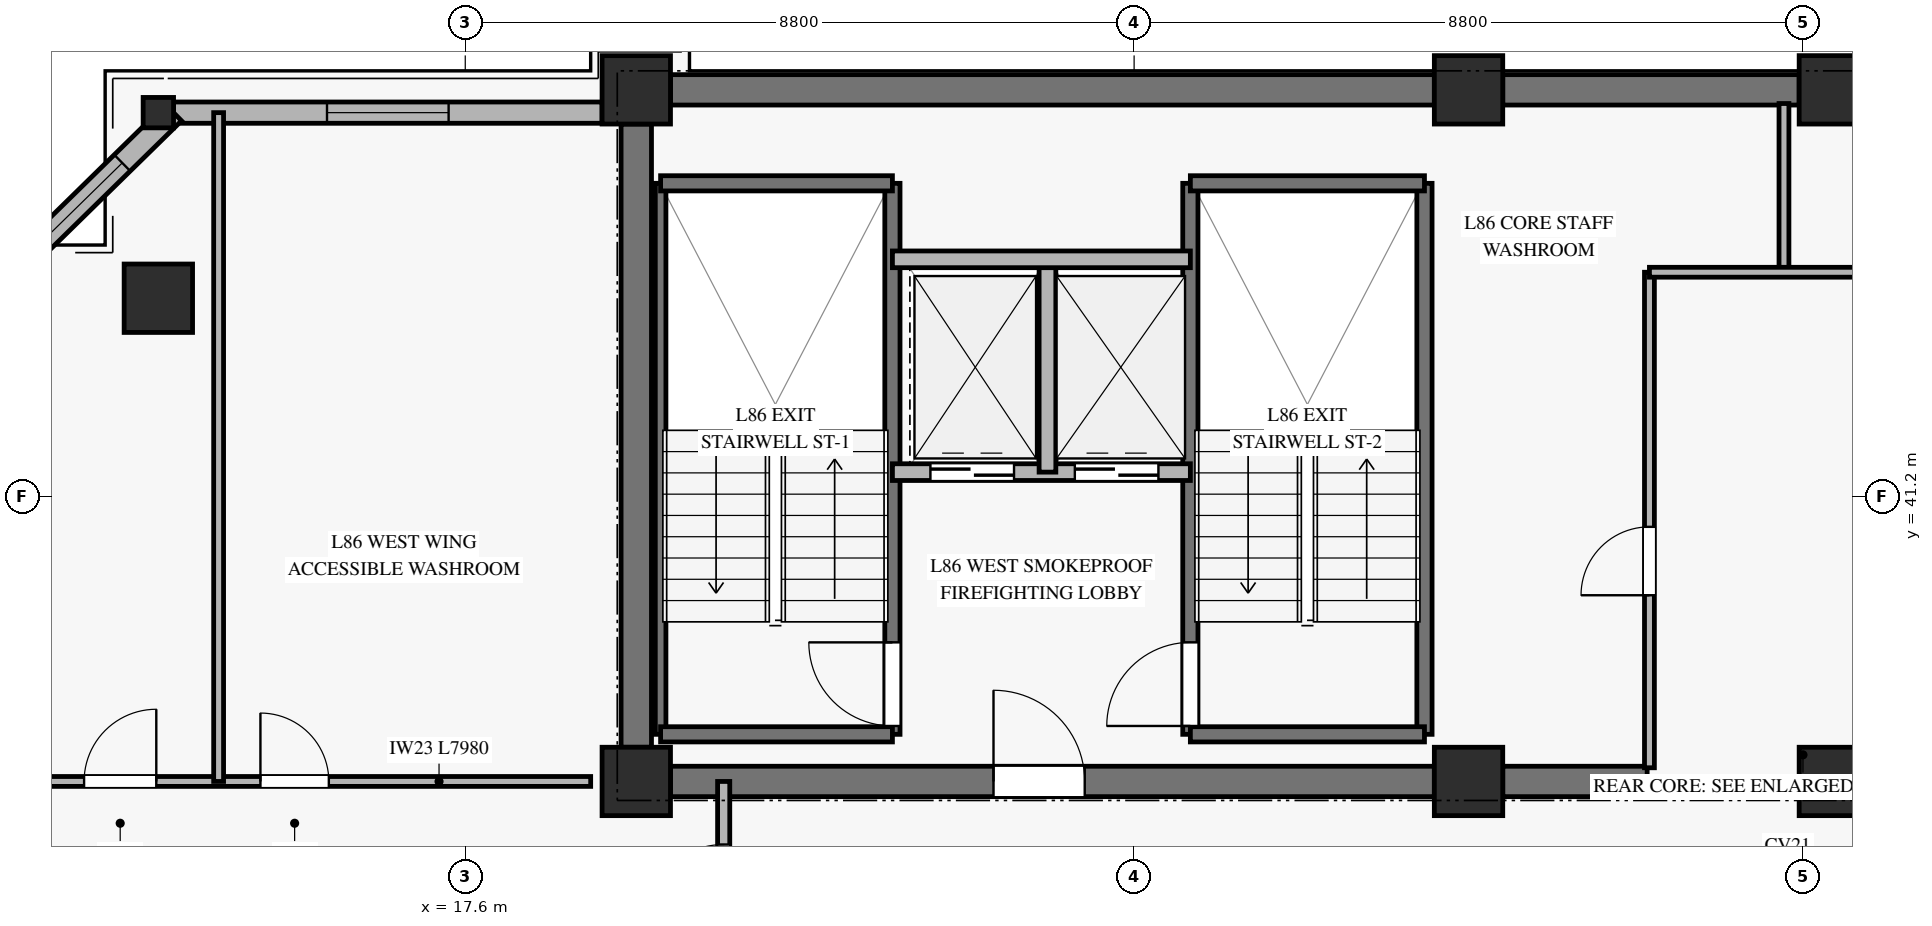
"""IFC4 building model, lengths in metres.
Left out: names, types, materials, properties, quantities, classifications, styles, units other than length and angle.
Written with IfcOpenShell. Run it as: python <this file> out.ifc"""

import sys

from ifc_helpers import new_model, si_unit, direction, frame, frame_2d, origin, origin_2d, place, context, subcontext, project, spatial, rectangle, hollow_rectangle, extrude, source, transform, mapped, element, fill, save


model = new_model("IFC4")
c1 = context("Model", 3, precision=1e-05, world=origin(), true_north=direction((0.0, 1.0)))
c2 = subcontext(c1, "Body", "Model", "MODEL_VIEW")
j1 = project(units=[si_unit("LENGTHUNIT", "METRE"), si_unit("PLANEANGLEUNIT", "RADIAN")], contexts=[c1])
p1 = place(None, origin())
s1 = spatial("IfcSite", under=j1, at=p1, CompositionType="ELEMENT")
p2 = place(p1, origin())
s2 = spatial("IfcBuilding", under=s1, at=p2, CompositionType="ELEMENT")
p3 = place(p2, frame((0.0, 0.0, 332.3)))
s3 = spatial("IfcBuildingStorey", under=s2, at=p3, CompositionType="ELEMENT", Elevation=332.3)
m1 = source(origin(), c2, "Body", "SweptSolid", [
    extrude(rectangle(XDim=0.9, YDim=0.9, at=origin_2d()), origin(), (0.0, 0.0, 1.0), 3.185),
])
for number, where, z_axis, x_axis in (
    (1, (19.85, 37.45, 0.0), (0.0, 0.0, 1.0), (1.0, 0.0, 0.0)),
    (2, (19.85, 46.55, 0.0), (0.0, 0.0, 1.0), (1.0, 0.0, 0.0)),
    (3, (30.8, 37.45, 0.0), (0.0, 0.0, 1.0), (1.0, 0.0, 0.0)),
    (4, (30.8, 46.55, 0.0), (0.0, 0.0, 1.0), (1.0, 0.0, 0.0)),
    (5, (35.6, 37.45, 0.0), (0.0, 0.0, 1.0), (1.0, 0.0, 0.0)),
    (6, (35.6, 46.55, 0.0), (0.0, 0.0, 1.0), (1.0, 0.0, 0.0)),
):
    element("IfcColumn", number, at=place(p3, frame(where, z_axis=z_axis, x_axis=x_axis)), inside=s3, PredefinedType="PILASTER", context=c2, shape_type="MappedRepresentation", body=[
        mapped(m1, transform((0.0, 0.0, 0.0), x_axis=(1.0, 0.0, 0.0), y_axis=(0.0, 1.0, 0.0), z_axis=(0.0, 0.0, 1.0), scale=1.0)),
    ])
p4 = place(p3, frame((20.3, 46.55, 0.0), z_axis=(0.0, 0.0, 1.0), x_axis=(1.0, 0.0, 0.0)))
e7 = element("IfcWall", 7, at=p4, inside=s3, PredefinedType="SHEAR", context=c2, shape_type="SweptSolid", body=[
    extrude(rectangle(XDim=10.05, YDim=0.4, at=frame_2d((5.025, 0.0))), origin(), (0.0, 0.0, 1.0), 3.185),
])
p5 = place(p3, frame((31.25, 46.55, 0.0), z_axis=(0.0, 0.0, 1.0), x_axis=(1.0, 0.0, 0.0)))
e8 = element("IfcWall", 8, at=p5, inside=s3, PredefinedType="SHEAR", context=c2, shape_type="SweptSolid", body=[
    extrude(rectangle(XDim=3.9, YDim=0.4, at=frame_2d((1.95, 0.0))), origin(), (0.0, 0.0, 1.0), 3.185),
])
p6 = place(p3, frame((20.3, 37.45, 0.0), z_axis=(0.0, 0.0, 1.0), x_axis=(1.0, 0.0, 0.0)))
e9 = element("IfcWall", 9, at=p6, inside=s3, PredefinedType="SHEAR", context=c2, shape_type="SweptSolid", body=[
    extrude(rectangle(XDim=10.05, YDim=0.4, at=frame_2d((5.025, 0.0))), origin(), (0.0, 0.0, 1.0), 3.185),
])
p7 = place(p6, frame((4.25, 0.0, 0.0)))
e10 = element("IfcOpeningElement", 10, at=p7, cuts=e9, PredefinedType="OPENING", context=c2, shape_type="SweptSolid", body=[
    extrude(rectangle(XDim=1.2, YDim=2.15, at=frame_2d((0.6, 1.075))), frame((0.0, 0.21, 0.0), z_axis=(0.0, -1.0, 0.0), x_axis=(1.0, 0.0, 0.0)), (0.0, 0.0, 1.0), 0.42),
])
p8 = place(p3, frame((31.25, 37.45, 0.0), z_axis=(0.0, 0.0, 1.0), x_axis=(1.0, 0.0, 0.0)))
e11 = element("IfcWall", 11, at=p8, inside=s3, PredefinedType="SHEAR", context=c2, shape_type="SweptSolid", body=[
    extrude(rectangle(XDim=1.9, YDim=0.4, at=frame_2d((0.95, 0.0))), origin(), (0.0, 0.0, 1.0), 3.185),
])
p9 = place(p3, frame((19.85, 37.9, 0.0), z_axis=(0.0, 0.0, 1.0), x_axis=(0.0, 1.0, 0.0)))
e12 = element("IfcWall", 12, at=p9, inside=s3, PredefinedType="SHEAR", context=c2, shape_type="SweptSolid", body=[
    extrude(rectangle(XDim=8.2, YDim=0.4, at=frame_2d((4.1, 0.0))), origin(), (0.0, 0.0, 1.0), 3.185),
])
m2 = source(origin(), c2, "Body", "SweptSolid", [
    extrude(hollow_rectangle(XDim=0.9, YDim=0.9, WallThickness=0.04, at=origin_2d()), origin(), (0.0, 0.0, 1.0), 3.207),
])
p10 = place(p3, frame((13.562, 43.808, 0.0), z_axis=(0.115040045039, 0.01431338747, 0.993257728375), x_axis=(-0.1234688995, 0.99234844226, 0.0)))
e13 = element("IfcColumn", 13, at=p10, inside=s3, PredefinedType="COLUMN", context=c2, shape_type="MappedRepresentation", body=[
    mapped(m2, transform((0.0, 0.0, 0.0), x_axis=(1.0, 0.0, 0.0), y_axis=(0.0, 1.0, 0.0), z_axis=(0.0, 0.0, 1.0), scale=1.0)),
])
m3 = source(origin(), c2, "Body", "SweptSolid", [
    extrude(hollow_rectangle(XDim=0.4, YDim=0.4, WallThickness=0.02, at=origin_2d()), origin(), (0.0, 0.0, 1.0), 3.206),
])
p11 = place(p3, frame((13.562, 46.25, 0.0), z_axis=(0.115051831153, 0.0, 0.993359489887), x_axis=(0.0, 1.0, 0.0)))
e14 = element("IfcColumn", 14, at=p11, inside=s3, PredefinedType="COLUMN", context=c2, shape_type="MappedRepresentation", body=[
    mapped(m3, transform((0.0, 0.0, 0.0), x_axis=(1.0, 0.0, 0.0), y_axis=(0.0, 1.0, 0.0), z_axis=(0.0, 0.0, 1.0), scale=1.0)),
])
p12 = place(p3, frame((13.762, 46.25, 0.0), z_axis=(0.0, 0.0, 1.0), x_axis=(1.0, 0.0, 0.0)))
e15 = element("IfcWall", 15, at=p12, inside=s3, PredefinedType="SOLIDWALL", context=c2, shape_type="SweptSolid", body=[
    extrude(rectangle(XDim=5.638, YDim=0.28, at=frame_2d((2.819, 0.0))), origin(), (0.0, 0.0, 1.0), 2.815),
])
p13 = place(p12, frame((2.019, 0.0, 0.45)))
e16 = element("IfcOpeningElement", 16, at=p13, cuts=e15, PredefinedType="OPENING", context=c2, shape_type="SweptSolid", body=[
    extrude(rectangle(XDim=1.6, YDim=2.0, at=frame_2d((0.8, 1.0))), frame((0.0, 0.15, 0.0), z_axis=(0.0, -1.0, 0.0), x_axis=(1.0, 0.0, 0.0)), (0.0, 0.0, 1.0), 0.3),
])
p14 = place(p3, frame((13.762, 46.25, 0.0), z_axis=(0.0, 0.0, 1.0), x_axis=(-0.714242921934, -0.699897884314, 0.0)))
e17 = element("IfcWall", 17, at=p14, inside=s3, PredefinedType="SOLIDWALL", context=c2, shape_type="SweptSolid", body=[
    extrude(rectangle(XDim=3.489, YDim=0.3, at=frame_2d((1.745, 0.0))), origin(), (0.0, 0.0, 1.0), 2.815),
])
p15 = place(p14, frame((0.945, 0.0, 0.45)))
e18 = element("IfcOpeningElement", 18, at=p15, cuts=e17, PredefinedType="OPENING", context=c2, shape_type="SweptSolid", body=[
    extrude(rectangle(XDim=1.6, YDim=2.0, at=frame_2d((0.8, 1.0))), frame((0.0, 0.16, 0.0), z_axis=(0.0, -1.0, 0.0), x_axis=(1.0, 0.0, 0.0)), (0.0, 0.0, 1.0), 0.32),
])
p16 = place(p3, frame((20.17, 38.07, 0.0), z_axis=(0.0, 0.0, 1.0), x_axis=(0.0, 1.0, 0.0)))
e19 = element("IfcWall", 19, at=p16, inside=s3, PredefinedType="SOLIDWALL", context=c2, shape_type="SweptSolid", body=[
    extrude(rectangle(XDim=7.25, YDim=0.14, at=frame_2d((3.625, 0.0))), origin(), (0.0, 0.0, 1.0), 3.4),
])
p17 = place(p3, frame((23.22, 38.07, 0.0), z_axis=(0.0, 0.0, 1.0), x_axis=(0.0, 1.0, 0.0)))
e20 = element("IfcWall", 20, at=p17, inside=s3, PredefinedType="SOLIDWALL", context=c2, shape_type="SweptSolid", body=[
    extrude(rectangle(XDim=7.25, YDim=0.2, at=frame_2d((3.625, 0.0))), origin(), (0.0, 0.0, 1.0), 3.4),
])
p18 = place(p17, frame((0.11, 0.0, 0.0)))
e21 = element("IfcOpeningElement", 21, at=p18, cuts=e20, PredefinedType="OPENING", context=c2, shape_type="SweptSolid", body=[
    extrude(rectangle(XDim=1.1, YDim=2.15, at=frame_2d((0.55, 1.075))), frame((0.0, 0.11, 0.0), z_axis=(0.0, -1.0, 0.0), x_axis=(1.0, 0.0, 0.0)), (0.0, 0.0, 1.0), 0.22),
])
for number, where, z_axis, x_axis in (
    (22, (20.17, 45.32, 0.0), (0.0, 0.0, 1.0), (1.0, 0.0, 0.0)),
    (23, (20.17, 38.07, 0.0), (0.0, 0.0, 1.0), (1.0, 0.0, 0.0)),
):
    element("IfcWall", number, at=place(p3, frame(where, z_axis=z_axis, x_axis=x_axis)), inside=s3, PredefinedType="SOLIDWALL", context=c2, shape_type="SweptSolid", body=[
        extrude(rectangle(XDim=3.05, YDim=0.2, at=frame_2d((1.525, 0.0))), origin(), (0.0, 0.0, 1.0), 3.4),
    ])
p19 = place(p3, frame((27.14, 38.07, 0.0), z_axis=(0.0, 0.0, 1.0), x_axis=(0.0, 1.0, 0.0)))
e24 = element("IfcWall", 24, at=p19, inside=s3, PredefinedType="SOLIDWALL", context=c2, shape_type="SweptSolid", body=[
    extrude(rectangle(XDim=7.25, YDim=0.2, at=frame_2d((3.625, 0.0))), origin(), (0.0, 0.0, 1.0), 3.4),
])
p20 = place(p19, frame((0.11, 0.0, 0.0)))
e25 = element("IfcOpeningElement", 25, at=p20, cuts=e24, PredefinedType="OPENING", context=c2, shape_type="SweptSolid", body=[
    extrude(rectangle(XDim=1.1, YDim=2.15, at=frame_2d((0.55, 1.075))), frame((0.0, 0.11, 0.0), z_axis=(0.0, -1.0, 0.0), x_axis=(1.0, 0.0, 0.0)), (0.0, 0.0, 1.0), 0.22),
])
p21 = place(p3, frame((30.22, 38.07, 0.0), z_axis=(0.0, 0.0, 1.0), x_axis=(0.0, 1.0, 0.0)))
e26 = element("IfcWall", 26, at=p21, inside=s3, PredefinedType="SOLIDWALL", context=c2, shape_type="SweptSolid", body=[
    extrude(rectangle(XDim=7.25, YDim=0.2, at=frame_2d((3.625, 0.0))), origin(), (0.0, 0.0, 1.0), 3.4),
])
for number, where, z_axis, x_axis in (
    (27, (27.14, 45.32, 0.0), (0.0, 0.0, 1.0), (1.0, 0.0, 0.0)),
    (28, (27.14, 38.07, 0.0), (0.0, 0.0, 1.0), (1.0, 0.0, 0.0)),
):
    element("IfcWall", number, at=place(p3, frame(where, z_axis=z_axis, x_axis=x_axis)), inside=s3, PredefinedType="SOLIDWALL", context=c2, shape_type="SweptSolid", body=[
        extrude(rectangle(XDim=3.08, YDim=0.2, at=frame_2d((1.54, 0.0))), origin(), (0.0, 0.0, 1.0), 3.4),
    ])
p22 = place(p3, frame((23.22, 41.52, 0.0), z_axis=(0.0, 0.0, 1.0), x_axis=(1.0, 0.0, 0.0)))
e29 = element("IfcWall", 29, at=p22, inside=s3, PredefinedType="SOLIDWALL", context=c2, shape_type="SweptSolid", body=[
    extrude(rectangle(XDim=3.92, YDim=0.22, at=frame_2d((1.96, 0.0))), origin(), (0.0, 0.0, 1.0), 3.185),
])
p23 = place(p22, frame((0.5, 0.0, 0.0)))
e30 = element("IfcOpeningElement", 30, at=p23, cuts=e29, PredefinedType="OPENING", context=c2, shape_type="SweptSolid", body=[
    extrude(rectangle(XDim=1.1, YDim=2.2, at=frame_2d((0.55, 1.1))), frame((0.0, 0.12, 0.0), z_axis=(0.0, -1.0, 0.0), x_axis=(1.0, 0.0, 0.0)), (0.0, 0.0, 1.0), 0.24),
])
p24 = place(p22, frame((2.4, 0.0, 0.0)))
e31 = element("IfcOpeningElement", 31, at=p24, cuts=e29, PredefinedType="OPENING", context=c2, shape_type="SweptSolid", body=[
    extrude(rectangle(XDim=1.1, YDim=2.2, at=frame_2d((0.55, 1.1))), frame((0.0, 0.12, 0.0), z_axis=(0.0, -1.0, 0.0), x_axis=(1.0, 0.0, 0.0)), (0.0, 0.0, 1.0), 0.24),
])
p25 = place(p3, frame((25.26, 41.52, 0.0), z_axis=(0.0, 0.0, 1.0), x_axis=(0.0, 1.0, 0.0)))
e32 = element("IfcWall", 32, at=p25, inside=s3, PredefinedType="SOLIDWALL", context=c2, shape_type="SweptSolid", body=[
    extrude(rectangle(XDim=2.8, YDim=0.22, at=frame_2d((1.4, 0.0))), origin(), (0.0, 0.0, 1.0), 3.185),
])
p26 = place(p3, frame((23.22, 44.32, 0.0), z_axis=(0.0, 0.0, 1.0), x_axis=(1.0, 0.0, 0.0)))
e33 = element("IfcWall", 33, at=p26, inside=s3, PredefinedType="SOLIDWALL", context=c2, shape_type="SweptSolid", body=[
    extrude(rectangle(XDim=3.92, YDim=0.22, at=frame_2d((1.96, 0.0))), origin(), (0.0, 0.0, 1.0), 3.185),
])
p27 = place(p3, frame((33.18, 37.63, 0.0), z_axis=(0.0, 0.0, 1.0), x_axis=(0.0, 1.0, 0.0)))
e34 = element("IfcWall", 34, at=p27, inside=s3, PredefinedType="PARTITIONING", context=c2, shape_type="SweptSolid", body=[
    extrude(rectangle(XDim=6.52, YDim=0.13, at=frame_2d((3.26, 0.0))), origin(), (0.0, 0.0, 1.0), 2.27),
])
p28 = place(p27, frame((2.27, 0.0, 0.0)))
e35 = element("IfcOpeningElement", 35, at=p28, cuts=e34, PredefinedType="OPENING", context=c2, shape_type="SweptSolid", body=[
    extrude(rectangle(XDim=0.9, YDim=2.1, at=frame_2d((0.45, 1.05))), frame((0.0, 0.075, 0.0), z_axis=(0.0, -1.0, 0.0), x_axis=(1.0, 0.0, 0.0)), (0.0, 0.0, 1.0), 0.15),
])
p29 = place(p3, frame((34.95, 44.15, 0.0), z_axis=(0.0, 0.0, 1.0), x_axis=(0.0, 1.0, 0.0)))
e36 = element("IfcWall", 36, at=p29, inside=s3, PredefinedType="PARTITIONING", context=c2, shape_type="SweptSolid", body=[
    extrude(rectangle(XDim=2.22, YDim=0.13, at=frame_2d((1.11, 0.0))), origin(), (0.0, 0.0, 1.0), 3.185),
])
p30 = place(p3, frame((33.18, 44.15, 0.0), z_axis=(0.0, 0.0, 1.0), x_axis=(1.0, 0.0, 0.0)))
e37 = element("IfcWall", 37, at=p30, inside=s3, PredefinedType="PARTITIONING", context=c2, shape_type="SweptSolid", body=[
    extrude(rectangle(XDim=2.94, YDim=0.13, at=frame_2d((1.47, 0.0))), origin(), (0.0, 0.0, 1.0), 2.47),
])
p31 = place(p3, frame((21.0, 21.636, 0.0), z_axis=(0.0, 0.0, 1.0), x_axis=(0.0, 1.0, 0.0)))
e38 = element("IfcWall", 38, at=p31, inside=s3, PredefinedType="PARTITIONING", context=c2, shape_type="SweptSolid", body=[
    extrude(rectangle(XDim=15.814, YDim=0.16, at=frame_2d((7.907, 0.0))), origin(), (0.0, 0.0, 1.0), 2.77),
])
p32 = place(p31, frame((13.934, 0.0, 0.0)))
e39 = element("IfcOpeningElement", 39, at=p32, cuts=e38, PredefinedType="OPENING", context=c2, shape_type="SweptSolid", body=[
    extrude(rectangle(XDim=1.05, YDim=2.15, at=frame_2d((0.525, 1.075))), frame((0.0, 0.09, 0.0), z_axis=(0.0, -1.0, 0.0), x_axis=(1.0, 0.0, 0.0)), (0.0, 0.0, 1.0), 0.18),
])
p33 = place(p3, frame((11.27, 37.45, 0.0), z_axis=(0.0, 0.0, 1.0), x_axis=(1.0, 0.0, 0.0)))
e40 = element("IfcWall", 40, at=p33, inside=s3, PredefinedType="PARTITIONING", context=c2, shape_type="SweptSolid", body=[
    extrude(rectangle(XDim=7.98, YDim=0.13, at=frame_2d((3.99, 0.0))), origin(), (0.0, 0.0, 1.0), 2.82),
])
p34 = place(p33, frame((1.315, 0.0, 0.0)))
e41 = element("IfcOpeningElement", 41, at=p34, cuts=e40, PredefinedType="OPENING", context=c2, shape_type="SweptSolid", body=[
    extrude(rectangle(XDim=0.95, YDim=2.1, at=frame_2d((0.475, 1.05))), frame((0.0, 0.075, 0.0), z_axis=(0.0, -1.0, 0.0), x_axis=(1.0, 0.0, 0.0)), (0.0, 0.0, 1.0), 0.15),
])
p35 = place(p33, frame((3.635, 0.0, 0.0)))
e42 = element("IfcOpeningElement", 42, at=p35, cuts=e40, PredefinedType="OPENING", context=c2, shape_type="SweptSolid", body=[
    extrude(rectangle(XDim=0.9, YDim=2.1, at=frame_2d((0.45, 1.05))), frame((0.0, 0.075, 0.0), z_axis=(0.0, -1.0, 0.0), x_axis=(1.0, 0.0, 0.0)), (0.0, 0.0, 1.0), 0.15),
])
p36 = place(p3, frame((14.355, 37.45, 0.0), z_axis=(0.0, 0.0, 1.0), x_axis=(0.0, 1.0, 0.0)))
e43 = element("IfcWall", 43, at=p36, inside=s3, PredefinedType="PARTITIONING", context=c2, shape_type="SweptSolid", body=[
    extrude(rectangle(XDim=8.8, YDim=0.13, at=frame_2d((4.4, 0.0))), origin(), (0.0, 0.0, 1.0), 3.185),
])
m4 = source(origin(), c2, "Body", "SweptSolid", [
    extrude(rectangle(XDim=1.6, YDim=2.0, at=frame_2d((0.8, 1.0))), frame((0.0, 0.03, 0.0), z_axis=(0.0, -1.0, 0.0), x_axis=(1.0, 0.0, 0.0)), (0.0, 0.0, 1.0), 0.06),
])
p37 = place(p13, origin())
e44 = element("IfcWindow", 44, at=p37, inside=s3, PartitioningType="SINGLE_PANEL", PredefinedType="WINDOW", context=c2, shape_type="MappedRepresentation", body=[
    mapped(m4, transform((0.0, 0.0, 0.0), x_axis=(1.0, 0.0, 0.0), y_axis=(0.0, 1.0, 0.0), z_axis=(0.0, 0.0, 1.0), scale=1.0)),
])
fill(e16, e44)
p38 = place(p15, origin())
e45 = element("IfcWindow", 45, at=p38, inside=s3, PartitioningType="SINGLE_PANEL", PredefinedType="WINDOW", context=c2, shape_type="MappedRepresentation", body=[
    mapped(m4, transform((0.0, 0.0, 0.0), x_axis=(1.0, 0.0, 0.0), y_axis=(0.0, 1.0, 0.0), z_axis=(0.0, 0.0, 1.0), scale=1.0)),
])
fill(e18, e45)
m5 = source(origin(), c2, "Body", "SweptSolid", [
    extrude(rectangle(XDim=1.1, YDim=2.15, at=frame_2d((0.55, 1.075))), frame((0.0, 0.025, 0.0), z_axis=(0.0, -1.0, 0.0), x_axis=(1.0, 0.0, 0.0)), (0.0, 0.0, 1.0), 0.05),
])
p39 = place(p18, origin())
e46 = element("IfcDoor", 46, at=p39, inside=s3, OperationType="SINGLE_SWING_RIGHT", PredefinedType="DOOR", context=c2, shape_type="MappedRepresentation", body=[
    mapped(m5, transform((0.0, 0.0, 0.0), x_axis=(1.0, 0.0, 0.0), y_axis=(0.0, 1.0, 0.0), z_axis=(0.0, 0.0, 1.0), scale=1.0)),
])
fill(e21, e46)
p40 = place(p20, origin())
e47 = element("IfcDoor", 47, at=p40, inside=s3, OperationType="SINGLE_SWING_LEFT", PredefinedType="DOOR", context=c2, shape_type="MappedRepresentation", body=[
    mapped(m5, transform((0.0, 0.0, 0.0), x_axis=(1.0, 0.0, 0.0), y_axis=(0.0, 1.0, 0.0), z_axis=(0.0, 0.0, 1.0), scale=1.0)),
])
fill(e25, e47)
m6 = source(origin(), c2, "Body", "SweptSolid", [
    extrude(rectangle(XDim=1.1, YDim=2.2, at=frame_2d((0.55, 1.1))), frame((0.0, 0.025, 0.0), z_axis=(0.0, -1.0, 0.0), x_axis=(1.0, 0.0, 0.0)), (0.0, 0.0, 1.0), 0.05),
])
p41 = place(p23, origin())
e48 = element("IfcDoor", 48, at=p41, inside=s3, OperationType="SLIDING_TO_LEFT", PredefinedType="DOOR", context=c2, shape_type="MappedRepresentation", body=[
    mapped(m6, transform((0.0, 0.0, 0.0), x_axis=(1.0, 0.0, 0.0), y_axis=(0.0, 1.0, 0.0), z_axis=(0.0, 0.0, 1.0), scale=1.0)),
])
fill(e30, e48)
p42 = place(p24, origin())
e49 = element("IfcDoor", 49, at=p42, inside=s3, OperationType="SLIDING_TO_LEFT", PredefinedType="DOOR", context=c2, shape_type="MappedRepresentation", body=[
    mapped(m6, transform((0.0, 0.0, 0.0), x_axis=(1.0, 0.0, 0.0), y_axis=(0.0, 1.0, 0.0), z_axis=(0.0, 0.0, 1.0), scale=1.0)),
])
fill(e31, e49)
m7 = source(origin(), c2, "Body", "SweptSolid", [
    extrude(rectangle(XDim=1.2, YDim=2.15, at=frame_2d((0.6, 1.075))), frame((0.0, 0.025, 0.0), z_axis=(0.0, -1.0, 0.0), x_axis=(1.0, 0.0, 0.0)), (0.0, 0.0, 1.0), 0.05),
])
p43 = place(p7, origin())
e50 = element("IfcDoor", 50, at=p43, inside=s3, OperationType="SINGLE_SWING_LEFT", PredefinedType="DOOR", context=c2, shape_type="MappedRepresentation", body=[
    mapped(m7, transform((0.0, 0.0, 0.0), x_axis=(1.0, 0.0, 0.0), y_axis=(0.0, 1.0, 0.0), z_axis=(0.0, 0.0, 1.0), scale=1.0)),
])
fill(e10, e50)
m8 = source(origin(), c2, "Body", "SweptSolid", [
    extrude(rectangle(XDim=0.9, YDim=2.1, at=frame_2d((0.45, 1.05))), frame((0.0, 0.025, 0.0), z_axis=(0.0, -1.0, 0.0), x_axis=(1.0, 0.0, 0.0)), (0.0, 0.0, 1.0), 0.05),
])
p44 = place(p28, origin())
e51 = element("IfcDoor", 51, at=p44, inside=s3, OperationType="SINGLE_SWING_LEFT", PredefinedType="DOOR", context=c2, shape_type="MappedRepresentation", body=[
    mapped(m8, transform((0.0, 0.0, 0.0), x_axis=(1.0, 0.0, 0.0), y_axis=(0.0, 1.0, 0.0), z_axis=(0.0, 0.0, 1.0), scale=1.0)),
])
fill(e35, e51)
m9 = source(origin(), c2, "Body", "SweptSolid", [
    extrude(rectangle(XDim=1.05, YDim=2.15, at=frame_2d((0.525, 1.075))), frame((0.0, 0.025, 0.0), z_axis=(0.0, -1.0, 0.0), x_axis=(1.0, 0.0, 0.0)), (0.0, 0.0, 1.0), 0.05),
])
p45 = place(p32, origin())
e52 = element("IfcDoor", 52, at=p45, inside=s3, OperationType="SINGLE_SWING_LEFT", PredefinedType="DOOR", context=c2, shape_type="MappedRepresentation", body=[
    mapped(m9, transform((0.0, 0.0, 0.0), x_axis=(1.0, 0.0, 0.0), y_axis=(0.0, 1.0, 0.0), z_axis=(0.0, 0.0, 1.0), scale=1.0)),
])
fill(e39, e52)
m10 = source(origin(), c2, "Body", "SweptSolid", [
    extrude(rectangle(XDim=0.95, YDim=2.1, at=frame_2d((0.475, 1.05))), frame((0.0, 0.025, 0.0), z_axis=(0.0, -1.0, 0.0), x_axis=(1.0, 0.0, 0.0)), (0.0, 0.0, 1.0), 0.05),
])
p46 = place(p34, origin())
e53 = element("IfcDoor", 53, at=p46, inside=s3, OperationType="SINGLE_SWING_RIGHT", PredefinedType="DOOR", context=c2, shape_type="MappedRepresentation", body=[
    mapped(m10, transform((0.0, 0.0, 0.0), x_axis=(1.0, 0.0, 0.0), y_axis=(0.0, 1.0, 0.0), z_axis=(0.0, 0.0, 1.0), scale=1.0)),
])
fill(e41, e53)
p47 = place(p35, origin())
e54 = element("IfcDoor", 54, at=p47, inside=s3, OperationType="SINGLE_SWING_LEFT", PredefinedType="DOOR", context=c2, shape_type="MappedRepresentation", body=[
    mapped(m8, transform((0.0, 0.0, 0.0), x_axis=(1.0, 0.0, 0.0), y_axis=(0.0, 1.0, 0.0), z_axis=(0.0, 0.0, 1.0), scale=1.0)),
])
fill(e42, e54)
save(model, sys.argv[1])
